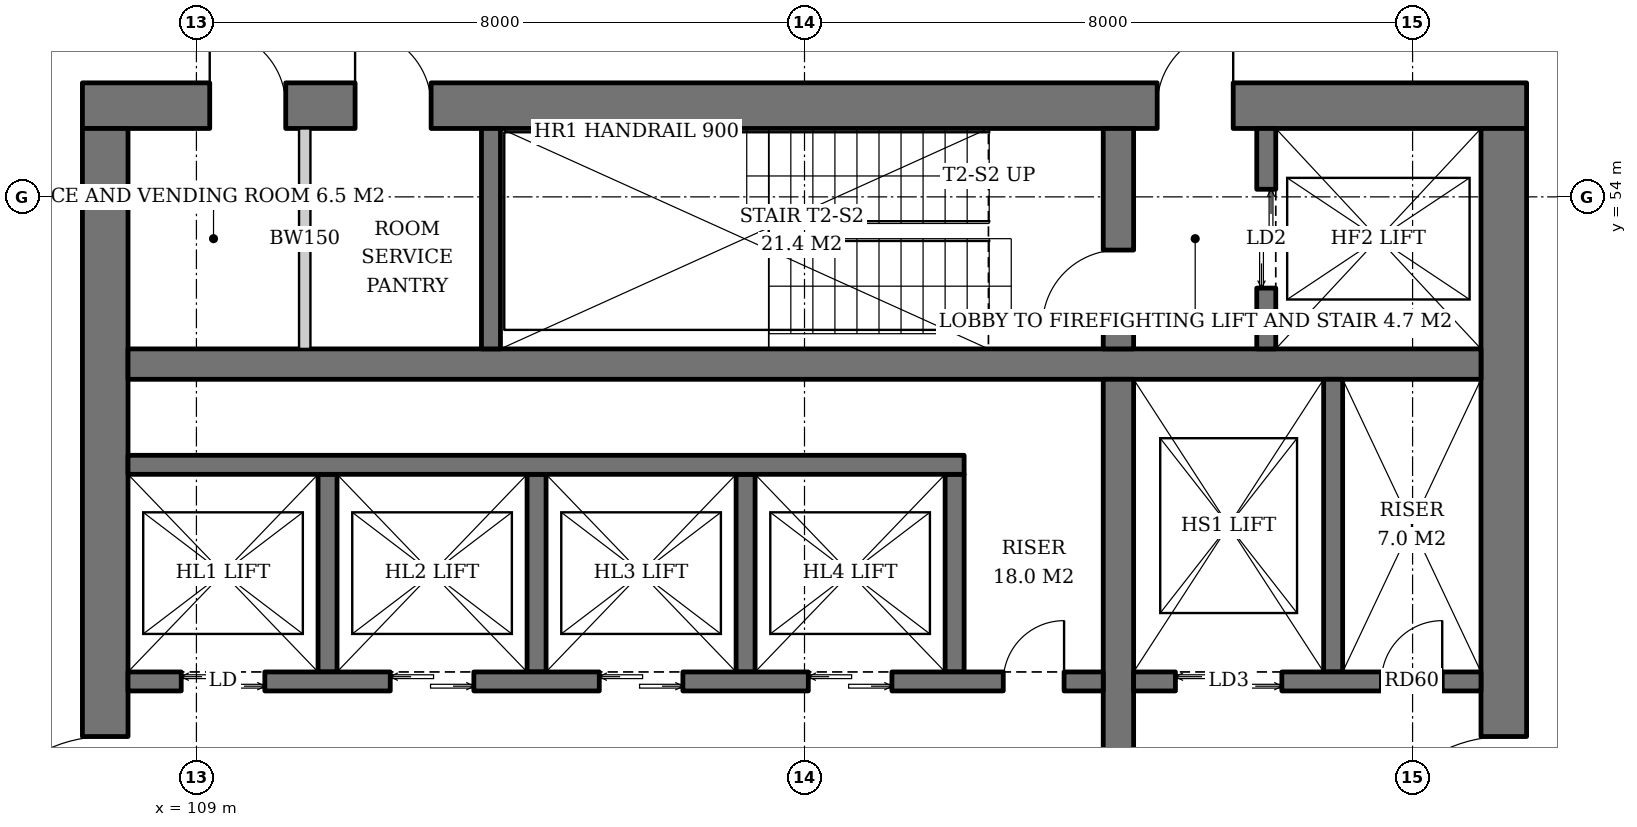
"""IFC4 building model, lengths in metres.
Left out: names, types, materials, properties, quantities, classifications, styles, units other than length and angle.
Written with IfcOpenShell. Run it as: python <this file> out.ifc"""

import sys

from ifc_helpers import new_model, si_unit, direction, frame, frame_2d, origin, place, context, subcontext, project, spatial, rectangle, extrude, element, fill, save


model = new_model("IFC4")
c1 = context("Model", 3, precision=1e-05, world=origin(), true_north=direction((0.0, 1.0)))
c2 = subcontext(c1, "Body", "Model", "MODEL_VIEW")
j1 = project(units=[si_unit("LENGTHUNIT", "METRE"), si_unit("PLANEANGLEUNIT", "RADIAN")], contexts=[c1])
p1 = place(None, origin())
s1 = spatial("IfcSite", under=j1, at=p1, CompositionType="ELEMENT")
p2 = place(p1, origin())
s2 = spatial("IfcBuilding", under=s1, at=p2, CompositionType="ELEMENT")
p3 = place(p2, frame((0.0, 0.0, 116.0)))
s3 = spatial("IfcBuildingStorey", under=s2, at=p3, CompositionType="ELEMENT", Elevation=116.0)
p4 = place(p3, frame((107.5, 55.2, 0.0), z_axis=(0.0, 0.0, 1.0), x_axis=(1.0, 0.0, 0.0)))
e1 = element("IfcWall", 1, at=p4, inside=s3, PredefinedType="SHEAR", context=c2, shape_type="SweptSolid", body=[
    extrude(rectangle(XDim=19.0, YDim=0.6, at=frame_2d((9.5, 0.0))), origin(), (0.0, 0.0, 1.0), 3.8),
])
p5 = place(p4, frame((14.14, 0.0, 0.0)))
e2 = element("IfcOpeningElement", 2, at=p5, cuts=e1, PredefinedType="OPENING", context=c2, shape_type="SweptSolid", body=[
    extrude(rectangle(XDim=1.0, YDim=2.1, at=frame_2d((0.5, 1.05))), frame((0.0, 0.31, 0.0), z_axis=(0.0, -1.0, 0.0), x_axis=(1.0, 0.0, 0.0)), (0.0, 0.0, 1.0), 0.62),
])
p6 = place(p4, frame((1.675, 0.0, 0.0)))
e3 = element("IfcOpeningElement", 3, at=p6, cuts=e1, PredefinedType="OPENING", context=c2, shape_type="SweptSolid", body=[
    extrude(rectangle(XDim=1.0, YDim=2.1, at=frame_2d((0.5, 1.05))), frame((0.0, 0.31, 0.0), z_axis=(0.0, -1.0, 0.0), x_axis=(1.0, 0.0, 0.0)), (0.0, 0.0, 1.0), 0.62),
])
p7 = place(p4, frame((3.587, 0.0, 0.0)))
e4 = element("IfcOpeningElement", 4, at=p7, cuts=e1, PredefinedType="OPENING", context=c2, shape_type="SweptSolid", body=[
    extrude(rectangle(XDim=1.0, YDim=2.1, at=frame_2d((0.5, 1.05))), frame((0.0, 0.31, 0.0), z_axis=(0.0, -1.0, 0.0), x_axis=(1.0, 0.0, 0.0)), (0.0, 0.0, 1.0), 0.62),
])
p8 = place(p3, frame((107.8, 37.1, 0.0), z_axis=(0.0, 0.0, 1.0), x_axis=(0.0, 1.0, 0.0)))
e5 = element("IfcWall", 5, at=p8, inside=s3, PredefinedType="SHEAR", context=c2, shape_type="SweptSolid", body=[
    extrude(rectangle(XDim=17.8, YDim=0.6, at=frame_2d((8.9, 0.0))), origin(), (0.0, 0.0, 1.0), 3.8),
])
p9 = place(p8, frame((8.0, 0.0, 0.0)))
e6 = element("IfcOpeningElement", 6, at=p9, cuts=e5, PredefinedType="OPENING", context=c2, shape_type="SweptSolid", body=[
    extrude(rectangle(XDim=1.8, YDim=2.4, at=frame_2d((0.9, 1.2))), frame((0.0, 0.31, 0.0), z_axis=(0.0, -1.0, 0.0), x_axis=(1.0, 0.0, 0.0)), (0.0, 0.0, 1.0), 0.62),
])
p10 = place(p3, frame((126.2, 37.1, 0.0), z_axis=(0.0, 0.0, 1.0), x_axis=(0.0, 1.0, 0.0)))
e7 = element("IfcWall", 7, at=p10, inside=s3, PredefinedType="SHEAR", context=c2, shape_type="SweptSolid", body=[
    extrude(rectangle(XDim=17.8, YDim=0.6, at=frame_2d((8.9, 0.0))), origin(), (0.0, 0.0, 1.0), 3.8),
])
p11 = place(p10, frame((8.0, 0.0, 0.0)))
e8 = element("IfcOpeningElement", 8, at=p11, cuts=e7, PredefinedType="OPENING", context=c2, shape_type="SweptSolid", body=[
    extrude(rectangle(XDim=1.8, YDim=2.4, at=frame_2d((0.9, 1.2))), frame((0.0, 0.31, 0.0), z_axis=(0.0, -1.0, 0.0), x_axis=(1.0, 0.0, 0.0)), (0.0, 0.0, 1.0), 0.62),
])
p12 = place(p3, frame((108.1, 51.8, 0.0), z_axis=(0.0, 0.0, 1.0), x_axis=(1.0, 0.0, 0.0)))
e9 = element("IfcWall", 9, at=p12, inside=s3, PredefinedType="SHEAR", context=c2, shape_type="SweptSolid", body=[
    extrude(rectangle(XDim=17.8, YDim=0.4, at=frame_2d((8.9, 0.0))), origin(), (0.0, 0.0, 1.0), 3.8),
])
p13 = place(p3, frame((121.13, 40.4, 0.0), z_axis=(0.0, 0.0, 1.0), x_axis=(0.0, 1.0, 0.0)))
e10 = element("IfcWall", 10, at=p13, inside=s3, PredefinedType="SHEAR", context=c2, shape_type="SweptSolid", body=[
    extrude(rectangle(XDim=11.2, YDim=0.4, at=frame_2d((5.6, 0.0))), origin(), (0.0, 0.0, 1.0), 3.8),
])
p14 = place(p3, frame((121.13, 52.0, 0.0), z_axis=(0.0, 0.0, 1.0), x_axis=(0.0, 1.0, 0.0)))
e11 = element("IfcWall", 11, at=p14, inside=s3, PredefinedType="SHEAR", context=c2, shape_type="SweptSolid", body=[
    extrude(rectangle(XDim=2.9, YDim=0.4, at=frame_2d((1.45, 0.0))), origin(), (0.0, 0.0, 1.0), 3.8),
])
p15 = place(p14, frame((0.3, 0.0, 0.0)))
e12 = element("IfcOpeningElement", 12, at=p15, cuts=e11, PredefinedType="OPENING", context=c2, shape_type="SweptSolid", body=[
    extrude(rectangle(XDim=1.0, YDim=2.1, at=frame_2d((0.5, 1.05))), frame((0.0, 0.21, 0.0), z_axis=(0.0, -1.0, 0.0), x_axis=(1.0, 0.0, 0.0)), (0.0, 0.0, 1.0), 0.42),
])
p16 = place(p3, frame((112.875, 52.0, 0.0), z_axis=(0.0, 0.0, 1.0), x_axis=(0.0, 1.0, 0.0)))
e13 = element("IfcWall", 13, at=p16, inside=s3, PredefinedType="SHEAR", context=c2, shape_type="SweptSolid", body=[
    extrude(rectangle(XDim=2.9, YDim=0.25, at=frame_2d((1.45, 0.0))), origin(), (0.0, 0.0, 1.0), 3.8),
])
p17 = place(p3, frame((123.075, 52.0, 0.0), z_axis=(0.0, 0.0, 1.0), x_axis=(0.0, 1.0, 0.0)))
e14 = element("IfcWall", 14, at=p17, inside=s3, PredefinedType="SHEAR", context=c2, shape_type="SweptSolid", body=[
    extrude(rectangle(XDim=2.9, YDim=0.25, at=frame_2d((1.45, 0.0))), origin(), (0.0, 0.0, 1.0), 3.8),
])
p18 = place(p17, frame((0.8, 0.0, 0.0)))
e15 = element("IfcOpeningElement", 15, at=p18, cuts=e14, PredefinedType="OPENING", context=c2, shape_type="SweptSolid", body=[
    extrude(rectangle(XDim=1.3, YDim=2.2, at=frame_2d((0.65, 1.1))), frame((0.0, 0.135, 0.0), z_axis=(0.0, -1.0, 0.0), x_axis=(1.0, 0.0, 0.0)), (0.0, 0.0, 1.0), 0.27),
])
for number, where, z_axis, x_axis in (
    (16, (110.725, 47.75, 0.0), (0.0, 0.0, 1.0), (0.0, 1.0, 0.0)),
    (17, (113.475, 47.75, 0.0), (0.0, 0.0, 1.0), (0.0, 1.0, 0.0)),
    (18, (116.225, 47.75, 0.0), (0.0, 0.0, 1.0), (0.0, 1.0, 0.0)),
    (19, (118.975, 47.75, 0.0), (0.0, 0.0, 1.0), (0.0, 1.0, 0.0)),
):
    element("IfcWall", number, at=place(p3, frame(where, z_axis=z_axis, x_axis=x_axis)), inside=s3, PredefinedType="SHEAR", context=c2, shape_type="SweptSolid", body=[
        extrude(rectangle(XDim=2.6, YDim=0.25, at=frame_2d((1.3, 0.0))), origin(), (0.0, 0.0, 1.0), 3.8),
    ])
p19 = place(p3, frame((108.1, 50.475, 0.0), z_axis=(0.0, 0.0, 1.0), x_axis=(1.0, 0.0, 0.0)))
e20 = element("IfcWall", 20, at=p19, inside=s3, PredefinedType="SHEAR", context=c2, shape_type="SweptSolid", body=[
    extrude(rectangle(XDim=11.0, YDim=0.25, at=frame_2d((5.5, 0.0))), origin(), (0.0, 0.0, 1.0), 3.8),
])
p20 = place(p3, frame((108.1, 47.625, 0.0), z_axis=(0.0, 0.0, 1.0), x_axis=(1.0, 0.0, 0.0)))
e21 = element("IfcWall", 21, at=p20, inside=s3, PredefinedType="SHEAR", context=c2, shape_type="SweptSolid", body=[
    extrude(rectangle(XDim=12.83, YDim=0.25, at=frame_2d((6.415, 0.0))), origin(), (0.0, 0.0, 1.0), 3.8),
])
p21 = place(p20, frame((0.7, 0.0, 0.0)))
e22 = element("IfcOpeningElement", 22, at=p21, cuts=e21, PredefinedType="OPENING", context=c2, shape_type="SweptSolid", body=[
    extrude(rectangle(XDim=1.1, YDim=2.2, at=frame_2d((0.55, 1.1))), frame((0.0, 0.135, 0.0), z_axis=(0.0, -1.0, 0.0), x_axis=(1.0, 0.0, 0.0)), (0.0, 0.0, 1.0), 0.27),
])
p22 = place(p20, frame((3.45, 0.0, 0.0)))
e23 = element("IfcOpeningElement", 23, at=p22, cuts=e21, PredefinedType="OPENING", context=c2, shape_type="SweptSolid", body=[
    extrude(rectangle(XDim=1.1, YDim=2.2, at=frame_2d((0.55, 1.1))), frame((0.0, 0.135, 0.0), z_axis=(0.0, -1.0, 0.0), x_axis=(1.0, 0.0, 0.0)), (0.0, 0.0, 1.0), 0.27),
])
p23 = place(p20, frame((6.2, 0.0, 0.0)))
e24 = element("IfcOpeningElement", 24, at=p23, cuts=e21, PredefinedType="OPENING", context=c2, shape_type="SweptSolid", body=[
    extrude(rectangle(XDim=1.1, YDim=2.2, at=frame_2d((0.55, 1.1))), frame((0.0, 0.135, 0.0), z_axis=(0.0, -1.0, 0.0), x_axis=(1.0, 0.0, 0.0)), (0.0, 0.0, 1.0), 0.27),
])
p24 = place(p20, frame((8.95, 0.0, 0.0)))
e25 = element("IfcOpeningElement", 25, at=p24, cuts=e21, PredefinedType="OPENING", context=c2, shape_type="SweptSolid", body=[
    extrude(rectangle(XDim=1.1, YDim=2.2, at=frame_2d((0.55, 1.1))), frame((0.0, 0.135, 0.0), z_axis=(0.0, -1.0, 0.0), x_axis=(1.0, 0.0, 0.0)), (0.0, 0.0, 1.0), 0.27),
])
p25 = place(p20, frame((11.515, 0.0, 0.0)))
e26 = element("IfcOpeningElement", 26, at=p25, cuts=e21, PredefinedType="OPENING", context=c2, shape_type="SweptSolid", body=[
    extrude(rectangle(XDim=0.8, YDim=2.0, at=frame_2d((0.4, 1.0))), frame((0.0, 0.135, 0.0), z_axis=(0.0, -1.0, 0.0), x_axis=(1.0, 0.0, 0.0)), (0.0, 0.0, 1.0), 0.27),
])
p26 = place(p3, frame((123.955, 47.75, 0.0), z_axis=(0.0, 0.0, 1.0), x_axis=(0.0, 1.0, 0.0)))
e27 = element("IfcWall", 27, at=p26, inside=s3, PredefinedType="SHEAR", context=c2, shape_type="SweptSolid", body=[
    extrude(rectangle(XDim=3.85, YDim=0.25, at=frame_2d((1.925, 0.0))), origin(), (0.0, 0.0, 1.0), 3.8),
])
p27 = place(p3, frame((121.33, 47.625, 0.0), z_axis=(0.0, 0.0, 1.0), x_axis=(1.0, 0.0, 0.0)))
e28 = element("IfcWall", 28, at=p27, inside=s3, PredefinedType="SHEAR", context=c2, shape_type="SweptSolid", body=[
    extrude(rectangle(XDim=4.57, YDim=0.25, at=frame_2d((2.285, 0.0))), origin(), (0.0, 0.0, 1.0), 3.8),
])
p28 = place(p27, frame((0.55, 0.0, 0.0)))
e29 = element("IfcOpeningElement", 29, at=p28, cuts=e28, PredefinedType="OPENING", context=c2, shape_type="SweptSolid", body=[
    extrude(rectangle(XDim=1.4, YDim=2.4, at=frame_2d((0.7, 1.2))), frame((0.0, 0.135, 0.0), z_axis=(0.0, -1.0, 0.0), x_axis=(1.0, 0.0, 0.0)), (0.0, 0.0, 1.0), 0.27),
])
p29 = place(p27, frame((3.26, 0.0, 0.0)))
e30 = element("IfcOpeningElement", 30, at=p29, cuts=e28, PredefinedType="OPENING", context=c2, shape_type="SweptSolid", body=[
    extrude(rectangle(XDim=0.8, YDim=2.0, at=frame_2d((0.4, 1.0))), frame((0.0, 0.135, 0.0), z_axis=(0.0, -1.0, 0.0), x_axis=(1.0, 0.0, 0.0)), (0.0, 0.0, 1.0), 0.27),
])
p30 = place(p3, frame((110.425, 52.0, 0.0), z_axis=(0.0, 0.0, 1.0), x_axis=(0.0, 1.0, 0.0)))
e31 = element("IfcWall", 31, at=p30, inside=s3, PredefinedType="SOLIDWALL", context=c2, shape_type="SweptSolid", body=[
    extrude(rectangle(XDim=2.9, YDim=0.15, at=frame_2d((1.45, 0.0))), origin(), (0.0, 0.0, 1.0), 3.6),
])
p31 = place(p18, origin())
e32 = element("IfcDoor", 32, at=p31, inside=s3, OperationType="DOUBLE_DOOR_SLIDING", PredefinedType="DOOR", context=c2, shape_type="SweptSolid", body=[
    extrude(rectangle(XDim=1.3, YDim=2.2, at=frame_2d((0.65, 1.1))), frame((0.0, 0.025, 0.0), z_axis=(0.0, -1.0, 0.0), x_axis=(1.0, 0.0, 0.0)), (0.0, 0.0, 1.0), 0.05),
])
fill(e15, e32)
p32 = place(p21, origin())
e33 = element("IfcDoor", 33, at=p32, inside=s3, OperationType="DOUBLE_DOOR_SLIDING", PredefinedType="DOOR", context=c2, shape_type="SweptSolid", body=[
    extrude(rectangle(XDim=1.1, YDim=2.2, at=frame_2d((0.55, 1.1))), frame((0.0, 0.025, 0.0), z_axis=(0.0, -1.0, 0.0), x_axis=(1.0, 0.0, 0.0)), (0.0, 0.0, 1.0), 0.05),
])
fill(e22, e33)
p33 = place(p22, origin())
e34 = element("IfcDoor", 34, at=p33, inside=s3, OperationType="DOUBLE_DOOR_SLIDING", PredefinedType="DOOR", context=c2, shape_type="SweptSolid", body=[
    extrude(rectangle(XDim=1.1, YDim=2.2, at=frame_2d((0.55, 1.1))), frame((0.0, 0.025, 0.0), z_axis=(0.0, -1.0, 0.0), x_axis=(1.0, 0.0, 0.0)), (0.0, 0.0, 1.0), 0.05),
])
fill(e23, e34)
p34 = place(p23, origin())
e35 = element("IfcDoor", 35, at=p34, inside=s3, OperationType="DOUBLE_DOOR_SLIDING", PredefinedType="DOOR", context=c2, shape_type="SweptSolid", body=[
    extrude(rectangle(XDim=1.1, YDim=2.2, at=frame_2d((0.55, 1.1))), frame((0.0, 0.025, 0.0), z_axis=(0.0, -1.0, 0.0), x_axis=(1.0, 0.0, 0.0)), (0.0, 0.0, 1.0), 0.05),
])
fill(e24, e35)
p35 = place(p24, origin())
e36 = element("IfcDoor", 36, at=p35, inside=s3, OperationType="DOUBLE_DOOR_SLIDING", PredefinedType="DOOR", context=c2, shape_type="SweptSolid", body=[
    extrude(rectangle(XDim=1.1, YDim=2.2, at=frame_2d((0.55, 1.1))), frame((0.0, 0.025, 0.0), z_axis=(0.0, -1.0, 0.0), x_axis=(1.0, 0.0, 0.0)), (0.0, 0.0, 1.0), 0.05),
])
fill(e25, e36)
p36 = place(p25, origin())
e37 = element("IfcDoor", 37, at=p36, inside=s3, OperationType="SINGLE_SWING_RIGHT", PredefinedType="DOOR", context=c2, shape_type="SweptSolid", body=[
    extrude(rectangle(XDim=0.8, YDim=2.0, at=frame_2d((0.4, 1.0))), frame((0.0, 0.025, 0.0), z_axis=(0.0, -1.0, 0.0), x_axis=(1.0, 0.0, 0.0)), (0.0, 0.0, 1.0), 0.05),
])
fill(e26, e37)
p37 = place(p28, origin())
e38 = element("IfcDoor", 38, at=p37, inside=s3, OperationType="DOUBLE_DOOR_SLIDING", PredefinedType="DOOR", context=c2, shape_type="SweptSolid", body=[
    extrude(rectangle(XDim=1.4, YDim=2.4, at=frame_2d((0.7, 1.2))), frame((0.0, 0.025, 0.0), z_axis=(0.0, -1.0, 0.0), x_axis=(1.0, 0.0, 0.0)), (0.0, 0.0, 1.0), 0.05),
])
fill(e29, e38)
p38 = place(p29, origin())
e39 = element("IfcDoor", 39, at=p38, inside=s3, OperationType="SINGLE_SWING_RIGHT", PredefinedType="DOOR", context=c2, shape_type="SweptSolid", body=[
    extrude(rectangle(XDim=0.8, YDim=2.0, at=frame_2d((0.4, 1.0))), frame((0.0, 0.025, 0.0), z_axis=(0.0, -1.0, 0.0), x_axis=(1.0, 0.0, 0.0)), (0.0, 0.0, 1.0), 0.05),
])
fill(e30, e39)
p39 = place(p15, origin())
e40 = element("IfcDoor", 40, at=p39, inside=s3, OperationType="SINGLE_SWING_LEFT", PredefinedType="DOOR", context=c2, shape_type="SweptSolid", body=[
    extrude(rectangle(XDim=1.0, YDim=2.1, at=frame_2d((0.5, 1.05))), frame((0.0, 0.025, 0.0), z_axis=(0.0, -1.0, 0.0), x_axis=(1.0, 0.0, 0.0)), (0.0, 0.0, 1.0), 0.05),
])
fill(e12, e40)
p40 = place(p5, origin())
e41 = element("IfcDoor", 41, at=p40, inside=s3, OperationType="SINGLE_SWING_RIGHT", PredefinedType="DOOR", context=c2, shape_type="SweptSolid", body=[
    extrude(rectangle(XDim=1.0, YDim=2.1, at=frame_2d((0.5, 1.05))), frame((0.0, 0.025, 0.0), z_axis=(0.0, -1.0, 0.0), x_axis=(1.0, 0.0, 0.0)), (0.0, 0.0, 1.0), 0.05),
])
fill(e2, e41)
p41 = place(p9, origin())
e42 = element("IfcDoor", 42, at=p41, inside=s3, OperationType="DOUBLE_DOOR_SINGLE_SWING", PredefinedType="DOOR", context=c2, shape_type="SweptSolid", body=[
    extrude(rectangle(XDim=1.8, YDim=2.4, at=frame_2d((0.9, 1.2))), frame((0.0, 0.025, 0.0), z_axis=(0.0, -1.0, 0.0), x_axis=(1.0, 0.0, 0.0)), (0.0, 0.0, 1.0), 0.05),
])
fill(e6, e42)
p42 = place(p11, origin())
e43 = element("IfcDoor", 43, at=p42, inside=s3, OperationType="DOUBLE_DOOR_SINGLE_SWING", PredefinedType="DOOR", context=c2, shape_type="SweptSolid", body=[
    extrude(rectangle(XDim=1.8, YDim=2.4, at=frame_2d((0.9, 1.2))), frame((0.0, 0.025, 0.0), z_axis=(0.0, -1.0, 0.0), x_axis=(1.0, 0.0, 0.0)), (0.0, 0.0, 1.0), 0.05),
])
fill(e8, e43)
p43 = place(p6, origin())
e44 = element("IfcDoor", 44, at=p43, inside=s3, OperationType="SINGLE_SWING_LEFT", PredefinedType="DOOR", context=c2, shape_type="SweptSolid", body=[
    extrude(rectangle(XDim=1.0, YDim=2.1, at=frame_2d((0.5, 1.05))), frame((0.0, -0.24, 0.0), z_axis=(0.0, -1.0, 0.0), x_axis=(1.0, 0.0, 0.0)), (0.0, 0.0, 1.0), 0.05),
])
fill(e3, e44)
p44 = place(p7, origin())
e45 = element("IfcDoor", 45, at=p44, inside=s3, OperationType="SINGLE_SWING_LEFT", PredefinedType="DOOR", context=c2, shape_type="SweptSolid", body=[
    extrude(rectangle(XDim=1.0, YDim=2.1, at=frame_2d((0.5, 1.05))), frame((0.0, -0.24, 0.0), z_axis=(0.0, -1.0, 0.0), x_axis=(1.0, 0.0, 0.0)), (0.0, 0.0, 1.0), 0.05),
])
fill(e4, e45)
save(model, sys.argv[1])
